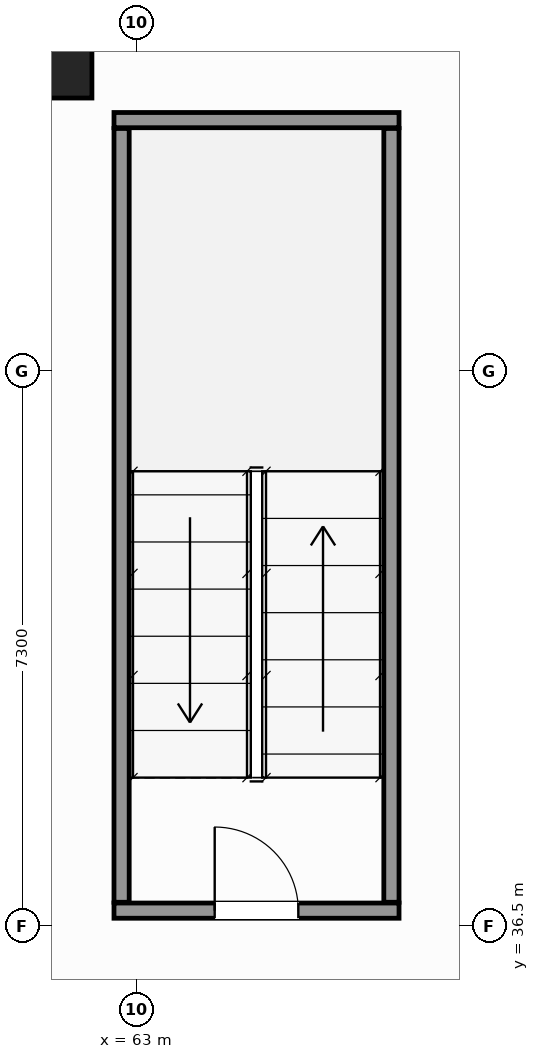
"""IFC4 building model, lengths in metres.
Left out: names, types, materials, properties, quantities, classifications, styles, units other than length and angle.
Written with IfcOpenShell. Run it as: python <this file> out.ifc"""

import sys

from ifc_helpers import new_model, si_unit, direction, frame, frame_2d, origin, origin_2d, place, context, subcontext, project, spatial, rectangle, hollow_circle, extrude, source, transform, mapped, element, fill, save


model = new_model("IFC4")
c1 = context("Model", 3, precision=1e-05, world=origin(), true_north=direction((0.0, 1.0)))
c2 = subcontext(c1, "Body", "Model", "MODEL_VIEW")
j1 = project(units=[si_unit("LENGTHUNIT", "METRE"), si_unit("PLANEANGLEUNIT", "RADIAN")], contexts=[c1])
p1 = place(None, origin())
s1 = spatial("IfcSite", under=j1, at=p1, CompositionType="ELEMENT")
p2 = place(p1, origin())
s2 = spatial("IfcBuilding", under=s1, at=p2, CompositionType="ELEMENT")
p3 = place(p2, frame((0.0, 0.0, 5.6)))
s3 = spatial("IfcBuildingStorey", under=s2, at=p3, CompositionType="ELEMENT", Elevation=5.6)
m1 = source(origin(), c2, "Body", "SweptSolid", [
    extrude(hollow_circle(Radius=0.61, WallThickness=0.05, at=origin_2d()), origin(), (0.0, 0.0, 1.0), 4.4),
])
p4 = place(p3, frame((61.8, 48.0, 0.0), z_axis=(0.0, 0.0, 1.0), x_axis=(1.0, 0.0, 0.0)))
e1 = element("IfcColumn", 1, at=p4, inside=s3, PredefinedType="COLUMN", context=c2, shape_type="MappedRepresentation", body=[
    mapped(m1, transform((0.0, 0.0, 0.0), scale=1.0)),
])
p5 = place(p3, frame((62.7, 36.7, 0.0), z_axis=(0.0, 0.0, 1.0), x_axis=(1.0, 0.0, 0.0)))
e2 = element("IfcWall", 2, at=p5, inside=s3, PredefinedType="SOLIDWALL", context=c2, shape_type="SweptSolid", body=[
    extrude(rectangle(XDim=3.75, YDim=0.2, at=frame_2d((1.875, 0.0))), origin(), (0.0, 0.0, 1.0), 4.4),
])
p6 = place(p5, frame((1.325, 0.0, 0.0)))
e3 = element("IfcOpeningElement", 3, at=p6, cuts=e2, PredefinedType="OPENING", context=c2, shape_type="SweptSolid", body=[
    extrude(rectangle(XDim=1.1, YDim=2.15, at=frame_2d((0.55, 1.075))), frame((0.0, 0.11, 0.0), z_axis=(0.0, -1.0, 0.0), x_axis=(1.0, 0.0, 0.0)), (0.0, 0.0, 1.0), 0.22),
])
p7 = place(p3, frame((62.7, 47.1, 0.0), z_axis=(0.0, 0.0, 1.0), x_axis=(1.0, 0.0, 0.0)))
e4 = element("IfcWall", 4, at=p7, inside=s3, PredefinedType="SOLIDWALL", context=c2, shape_type="SweptSolid", body=[
    extrude(rectangle(XDim=3.75, YDim=0.2, at=frame_2d((1.875, 0.0))), origin(), (0.0, 0.0, 1.0), 4.4),
])
for number, where, z_axis, x_axis in (
    (5, (62.8, 36.81, 0.0), (0.0, 0.0, 1.0), (0.0, 1.0, 0.0)),
    (6, (66.35, 36.81, 0.0), (0.0, 0.0, 1.0), (0.0, 1.0, 0.0)),
):
    element("IfcWall", number, at=place(p3, frame(where, z_axis=z_axis, x_axis=x_axis)), inside=s3, PredefinedType="SOLIDWALL", context=c2, shape_type="SweptSolid", body=[
        extrude(rectangle(XDim=10.18, YDim=0.2, at=frame_2d((5.09, 0.0))), origin(), (0.0, 0.0, 1.0), 4.4),
    ])
m2 = source(origin(), c2, "Body", "SweptSolid", [
    extrude(rectangle(XDim=1.1, YDim=2.15, at=frame_2d((0.55, 1.075))), frame((0.0, 0.025, 0.0), z_axis=(0.0, -1.0, 0.0), x_axis=(1.0, 0.0, 0.0)), (0.0, 0.0, 1.0), 0.05),
])
p8 = place(p6, origin())
e7 = element("IfcDoor", 7, at=p8, inside=s3, OperationType="SINGLE_SWING_RIGHT", PredefinedType="DOOR", context=c2, shape_type="MappedRepresentation", body=[
    mapped(m2, transform((0.0, 0.0, 0.0), scale=1.0)),
])
fill(e3, e7)
save(model, sys.argv[1])
